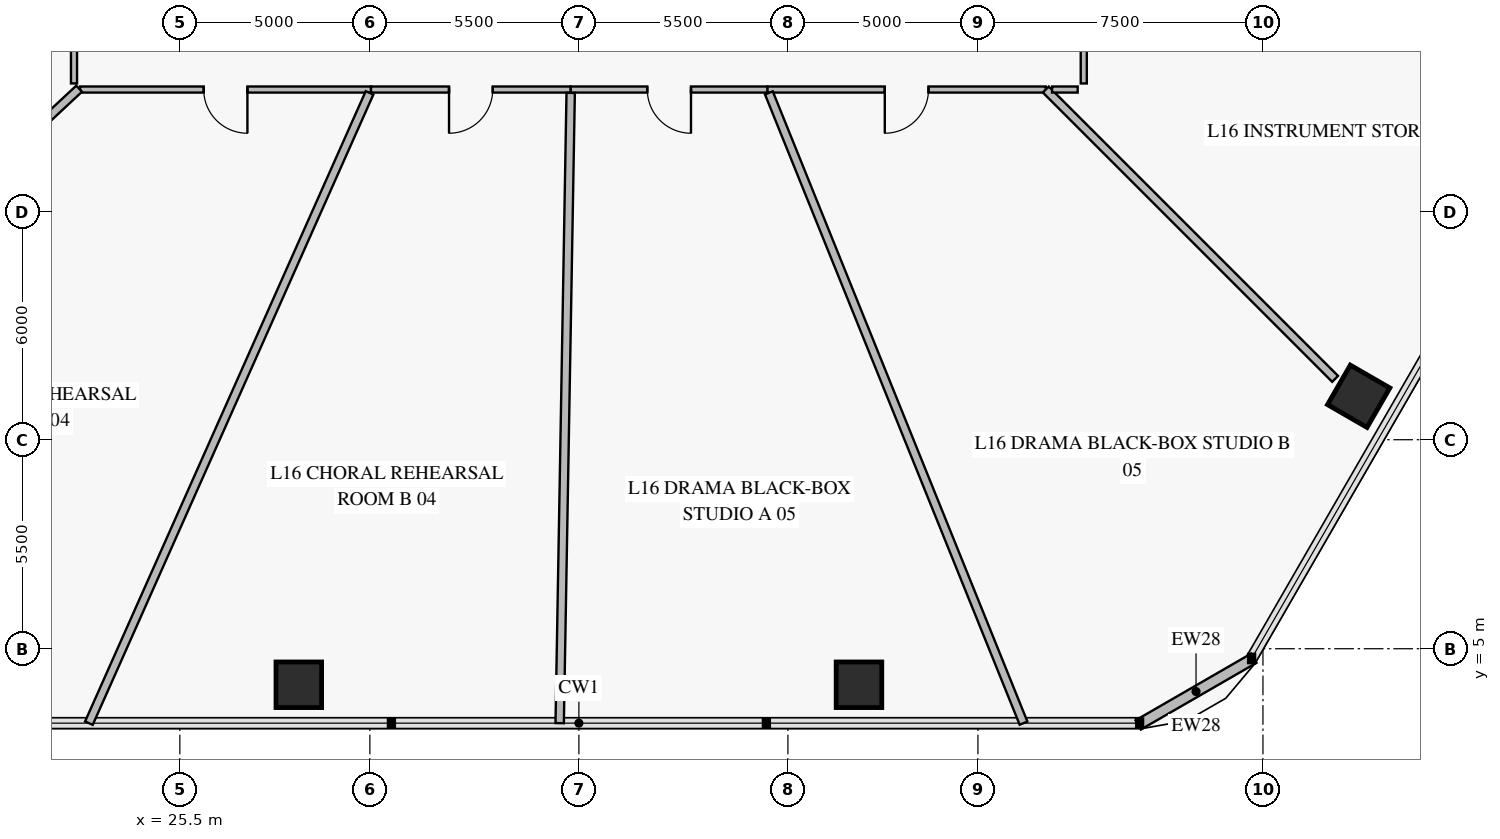
"""IFC4 building model, lengths in metres.
Left out: names, types, materials, properties, quantities, classifications, styles, units other than length and angle.
Written with IfcOpenShell. Run it as: python <this file> out.ifc"""

import sys

from ifc_helpers import new_model, si_unit, direction, frame, frame_2d, origin, origin_2d, place, context, subcontext, project, spatial, rectangle, extrude, element, fill, save


model = new_model("IFC4")
c1 = context("Model", 3, precision=1e-05, world=origin(), true_north=direction((0.0, 1.0)))
c2 = subcontext(c1, "Body", "Model", "MODEL_VIEW")
j1 = project(units=[si_unit("LENGTHUNIT", "METRE"), si_unit("PLANEANGLEUNIT", "RADIAN")], contexts=[c1])
p1 = place(None, origin())
s1 = spatial("IfcSite", under=j1, at=p1, CompositionType="ELEMENT")
p2 = place(p1, origin())
s2 = spatial("IfcBuilding", under=s1, at=p2, CompositionType="ELEMENT")
p3 = place(p2, frame((0.0, 0.0, 66.6)))
s3 = spatial("IfcBuildingStorey", under=s2, at=p3, CompositionType="ELEMENT", Elevation=66.6)
for number, where, z_axis, x_axis in (
    (1, (28.63, 4.052, 0.0), (0.0, 0.0, 1.0), (1.0, 0.0, 0.0)),
    (2, (43.37, 4.052, 0.0), (0.0, 0.0, 1.0), (1.0, 0.0, 0.0)),
    (3, (56.519, 11.643, 0.0), (0.0, 0.0, 1.0), (0.5, 0.866, 0.0)),
):
    element("IfcColumn", number, at=place(p3, frame(where, z_axis=z_axis, x_axis=x_axis)), inside=s3, PredefinedType="COLUMN", context=c2, shape_type="SweptSolid", body=[
        extrude(rectangle(XDim=1.2, YDim=1.2, at=origin_2d()), origin(), (0.0, 0.0, 1.0), 3.92),
    ])
p4 = place(p3, frame((53.761, 4.751, 0.0), z_axis=(0.0, 0.0, 1.0), x_axis=(-0.866007452331, -0.500031091541, 0.0)))
e4 = element("IfcWall", 4, at=p4, inside=s3, PredefinedType="SOLIDWALL", context=c2, shape_type="SweptSolid", body=[
    extrude(rectangle(XDim=3.515, YDim=0.28, at=frame_2d((1.757, 0.0))), origin(), (0.0, 0.0, 1.0), 3.92),
])
p5 = place(p3, frame((22.715, 34.104, 0.0), z_axis=(0.0, 0.0, 1.0), x_axis=(0.0, -1.0, 0.0)))
e5 = element("IfcWall", 5, at=p5, inside=s3, PredefinedType="PARTITIONING", context=c2, shape_type="SweptSolid", body=[
    extrude(rectangle(XDim=14.229, YDim=0.16, at=frame_2d((7.115, 0.0))), origin(), (0.0, 0.0, 1.0), 3.22),
])
p6 = place(p5, frame((6.54, 0.0, 0.0)))
e6 = element("IfcOpeningElement", 6, at=p6, cuts=e5, PredefinedType="OPENING", context=c2, shape_type="SweptSolid", body=[
    extrude(rectangle(XDim=1.15, YDim=2.2, at=frame_2d((0.575, 1.1))), frame((0.0, 0.092, 0.0), z_axis=(0.0, -1.0, 0.0), x_axis=(1.0, 0.0, 0.0)), (0.0, 0.0, 1.0), 0.184),
])
p7 = place(p3, frame((22.875, 19.715, 0.0), z_axis=(0.0, 0.0, 1.0), x_axis=(1.0, 0.0, 0.0)))
e7 = element("IfcWall", 7, at=p7, inside=s3, PredefinedType="PARTITIONING", context=c2, shape_type="SweptSolid", body=[
    extrude(rectangle(XDim=7.656, YDim=0.16, at=frame_2d((3.828, 0.0))), origin(), (0.0, 0.0, 1.0), 3.22),
])
p8 = place(p7, frame((3.253, 0.0, 0.0)))
e8 = element("IfcOpeningElement", 8, at=p8, cuts=e7, PredefinedType="OPENING", context=c2, shape_type="SweptSolid", body=[
    extrude(rectangle(XDim=1.15, YDim=2.2, at=frame_2d((0.575, 1.1))), frame((0.0, 0.092, 0.0), z_axis=(0.0, -1.0, 0.0), x_axis=(1.0, 0.0, 0.0)), (0.0, 0.0, 1.0), 0.184),
])
p9 = place(p3, frame((30.531, 19.715, 0.0), z_axis=(0.0, 0.0, 1.0), x_axis=(1.0, 0.0, 0.0)))
e9 = element("IfcWall", 9, at=p9, inside=s3, PredefinedType="PARTITIONING", context=c2, shape_type="SweptSolid", body=[
    extrude(rectangle(XDim=5.255, YDim=0.16, at=frame_2d((2.627, 0.0))), origin(), (0.0, 0.0, 1.0), 3.22),
])
p10 = place(p9, frame((2.052, 0.0, 0.0)))
e10 = element("IfcOpeningElement", 10, at=p10, cuts=e9, PredefinedType="OPENING", context=c2, shape_type="SweptSolid", body=[
    extrude(rectangle(XDim=1.15, YDim=2.2, at=frame_2d((0.575, 1.1))), frame((0.0, 0.092, 0.0), z_axis=(0.0, -1.0, 0.0), x_axis=(1.0, 0.0, 0.0)), (0.0, 0.0, 1.0), 0.184),
])
p11 = place(p3, frame((35.786, 19.715, 0.0), z_axis=(0.0, 0.0, 1.0), x_axis=(1.0, 0.0, 0.0)))
e11 = element("IfcWall", 11, at=p11, inside=s3, PredefinedType="PARTITIONING", context=c2, shape_type="SweptSolid", body=[
    extrude(rectangle(XDim=5.178, YDim=0.16, at=frame_2d((2.589, 0.0))), origin(), (0.0, 0.0, 1.0), 3.22),
])
p12 = place(p11, frame((2.014, 0.0, 0.0)))
e12 = element("IfcOpeningElement", 12, at=p12, cuts=e11, PredefinedType="OPENING", context=c2, shape_type="SweptSolid", body=[
    extrude(rectangle(XDim=1.15, YDim=2.2, at=frame_2d((0.575, 1.1))), frame((0.0, 0.092, 0.0), z_axis=(0.0, -1.0, 0.0), x_axis=(1.0, 0.0, 0.0)), (0.0, 0.0, 1.0), 0.184),
])
p13 = place(p3, frame((40.963, 19.715, 0.0), z_axis=(0.0, 0.0, 1.0), x_axis=(1.0, 0.0, 0.0)))
e13 = element("IfcWall", 13, at=p13, inside=s3, PredefinedType="PARTITIONING", context=c2, shape_type="SweptSolid", body=[
    extrude(rectangle(XDim=7.322, YDim=0.16, at=frame_2d((3.661, 0.0))), origin(), (0.0, 0.0, 1.0), 3.22),
])
p14 = place(p13, frame((3.086, 0.0, 0.0)))
e14 = element("IfcOpeningElement", 14, at=p14, cuts=e13, PredefinedType="OPENING", context=c2, shape_type="SweptSolid", body=[
    extrude(rectangle(XDim=1.15, YDim=2.2, at=frame_2d((0.575, 1.1))), frame((0.0, 0.092, 0.0), z_axis=(0.0, -1.0, 0.0), x_axis=(1.0, 0.0, 0.0)), (0.0, 0.0, 1.0), 0.184),
])
p15 = place(p3, frame((49.285, 19.875, 0.0), z_axis=(0.0, 0.0, 1.0), x_axis=(0.0, 1.0, 0.0)))
e15 = element("IfcWall", 15, at=p15, inside=s3, PredefinedType="PARTITIONING", context=c2, shape_type="SweptSolid", body=[
    extrude(rectangle(XDim=6.622, YDim=0.16, at=frame_2d((3.311, 0.0))), origin(), (0.0, 0.0, 1.0), 3.92),
])
p16 = place(p15, frame((2.836, 0.0, 0.0)))
e16 = element("IfcOpeningElement", 16, at=p16, cuts=e15, PredefinedType="OPENING", context=c2, shape_type="SweptSolid", body=[
    extrude(rectangle(XDim=0.95, YDim=2.1, at=frame_2d((0.475, 1.05))), frame((0.0, 0.092, 0.0), z_axis=(0.0, -1.0, 0.0), x_axis=(1.0, 0.0, 0.0)), (0.0, 0.0, 1.0), 0.184),
])
p17 = place(p3, frame((22.85, 19.737, 0.0), z_axis=(0.0, 0.0, 1.0), x_axis=(-0.731360864489, -0.681990678744, 0.0)))
e17 = element("IfcWall", 17, at=p17, inside=s3, PredefinedType="PARTITIONING", context=c2, shape_type="SweptSolid", body=[
    extrude(rectangle(XDim=11.74, YDim=0.22, at=frame_2d((5.87, 0.0))), origin(), (0.0, 0.0, 1.0), 3.17),
])
p18 = place(p3, frame((30.491, 19.627, 0.0), z_axis=(0.0, 0.0, 1.0), x_axis=(-0.406746008396, -0.913541287876, 0.0)))
e18 = element("IfcWall", 18, at=p18, inside=s3, PredefinedType="PARTITIONING", context=c2, shape_type="SweptSolid", body=[
    extrude(rectangle(XDim=18.155, YDim=0.22, at=frame_2d((9.078, 0.0))), origin(), (0.0, 0.0, 1.0), 3.17),
])
p19 = place(p3, frame((35.784, 19.627, 0.0), z_axis=(0.0, 0.0, 1.0), x_axis=(-0.01745546123, -0.99984764183, 0.0)))
e19 = element("IfcWall", 19, at=p19, inside=s3, PredefinedType="PARTITIONING", context=c2, shape_type="SweptSolid", body=[
    extrude(rectangle(XDim=16.588, YDim=0.22, at=frame_2d((8.294, 0.0))), origin(), (0.0, 0.0, 1.0), 3.17),
])
p20 = place(p3, frame((40.999, 19.627, 0.0), z_axis=(0.0, 0.0, 1.0), x_axis=(0.374605213306, -0.927184412166, 0.0)))
e20 = element("IfcWall", 20, at=p20, inside=s3, PredefinedType="PARTITIONING", context=c2, shape_type="SweptSolid", body=[
    extrude(rectangle(XDim=17.888, YDim=0.22, at=frame_2d((8.944, 0.0))), origin(), (0.0, 0.0, 1.0), 3.17),
])
p21 = place(p3, frame((48.285, 19.715, 0.0), z_axis=(0.0, 0.0, 1.0), x_axis=(0.707106781187, -0.707106781187, 0.0)))
e21 = element("IfcWall", 21, at=p21, inside=s3, PredefinedType="PARTITIONING", context=c2, shape_type="SweptSolid", body=[
    extrude(rectangle(XDim=10.768, YDim=0.22, at=frame_2d((5.384, 0.0))), origin(), (0.0, 0.0, 1.0), 3.22),
])
p22 = place(p3, frame((48.452, 19.715, 0.0), z_axis=(0.0, 0.0, 1.0), x_axis=(1.0, 0.0, 0.0)))
e22 = element("IfcWall", 22, at=p22, inside=s3, PredefinedType="PARTITIONING", context=c2, shape_type="SweptSolid", body=[
    extrude(rectangle(XDim=0.673, YDim=0.16, at=frame_2d((0.336, 0.0))), origin(), (0.0, 0.0, 1.0), 3.22),
])
p23 = place(p8, frame((1.15, 0.0, 0.0), z_axis=(0.0, 0.0, 1.0), x_axis=(-1.0, 0.0, 0.0)))
e23 = element("IfcDoor", 23, at=p23, inside=s3, OperationType="SINGLE_SWING_LEFT", PredefinedType="DOOR", context=c2, shape_type="SweptSolid", body=[
    extrude(rectangle(XDim=1.15, YDim=2.2, at=frame_2d((0.575, 1.1))), frame((0.0, 0.025, 0.0), z_axis=(0.0, -1.0, 0.0), x_axis=(1.0, 0.0, 0.0)), (0.0, 0.0, 1.0), 0.05),
])
fill(e8, e23)
p24 = place(p10, frame((1.15, 0.0, 0.0), z_axis=(0.0, 0.0, 1.0), x_axis=(-1.0, 0.0, 0.0)))
e24 = element("IfcDoor", 24, at=p24, inside=s3, OperationType="SINGLE_SWING_RIGHT", PredefinedType="DOOR", context=c2, shape_type="SweptSolid", body=[
    extrude(rectangle(XDim=1.15, YDim=2.2, at=frame_2d((0.575, 1.1))), frame((0.0, 0.025, 0.0), z_axis=(0.0, -1.0, 0.0), x_axis=(1.0, 0.0, 0.0)), (0.0, 0.0, 1.0), 0.05),
])
fill(e10, e24)
p25 = place(p12, frame((1.15, 0.0, 0.0), z_axis=(0.0, 0.0, 1.0), x_axis=(-1.0, 0.0, 0.0)))
e25 = element("IfcDoor", 25, at=p25, inside=s3, OperationType="SINGLE_SWING_LEFT", PredefinedType="DOOR", context=c2, shape_type="SweptSolid", body=[
    extrude(rectangle(XDim=1.15, YDim=2.2, at=frame_2d((0.575, 1.1))), frame((0.0, 0.025, 0.0), z_axis=(0.0, -1.0, 0.0), x_axis=(1.0, 0.0, 0.0)), (0.0, 0.0, 1.0), 0.05),
])
fill(e12, e25)
p26 = place(p14, frame((1.15, 0.0, 0.0), z_axis=(0.0, 0.0, 1.0), x_axis=(-1.0, 0.0, 0.0)))
e26 = element("IfcDoor", 26, at=p26, inside=s3, OperationType="SINGLE_SWING_RIGHT", PredefinedType="DOOR", context=c2, shape_type="SweptSolid", body=[
    extrude(rectangle(XDim=1.15, YDim=2.2, at=frame_2d((0.575, 1.1))), frame((0.0, 0.025, 0.0), z_axis=(0.0, -1.0, 0.0), x_axis=(1.0, 0.0, 0.0)), (0.0, 0.0, 1.0), 0.05),
])
fill(e14, e26)
save(model, sys.argv[1])
